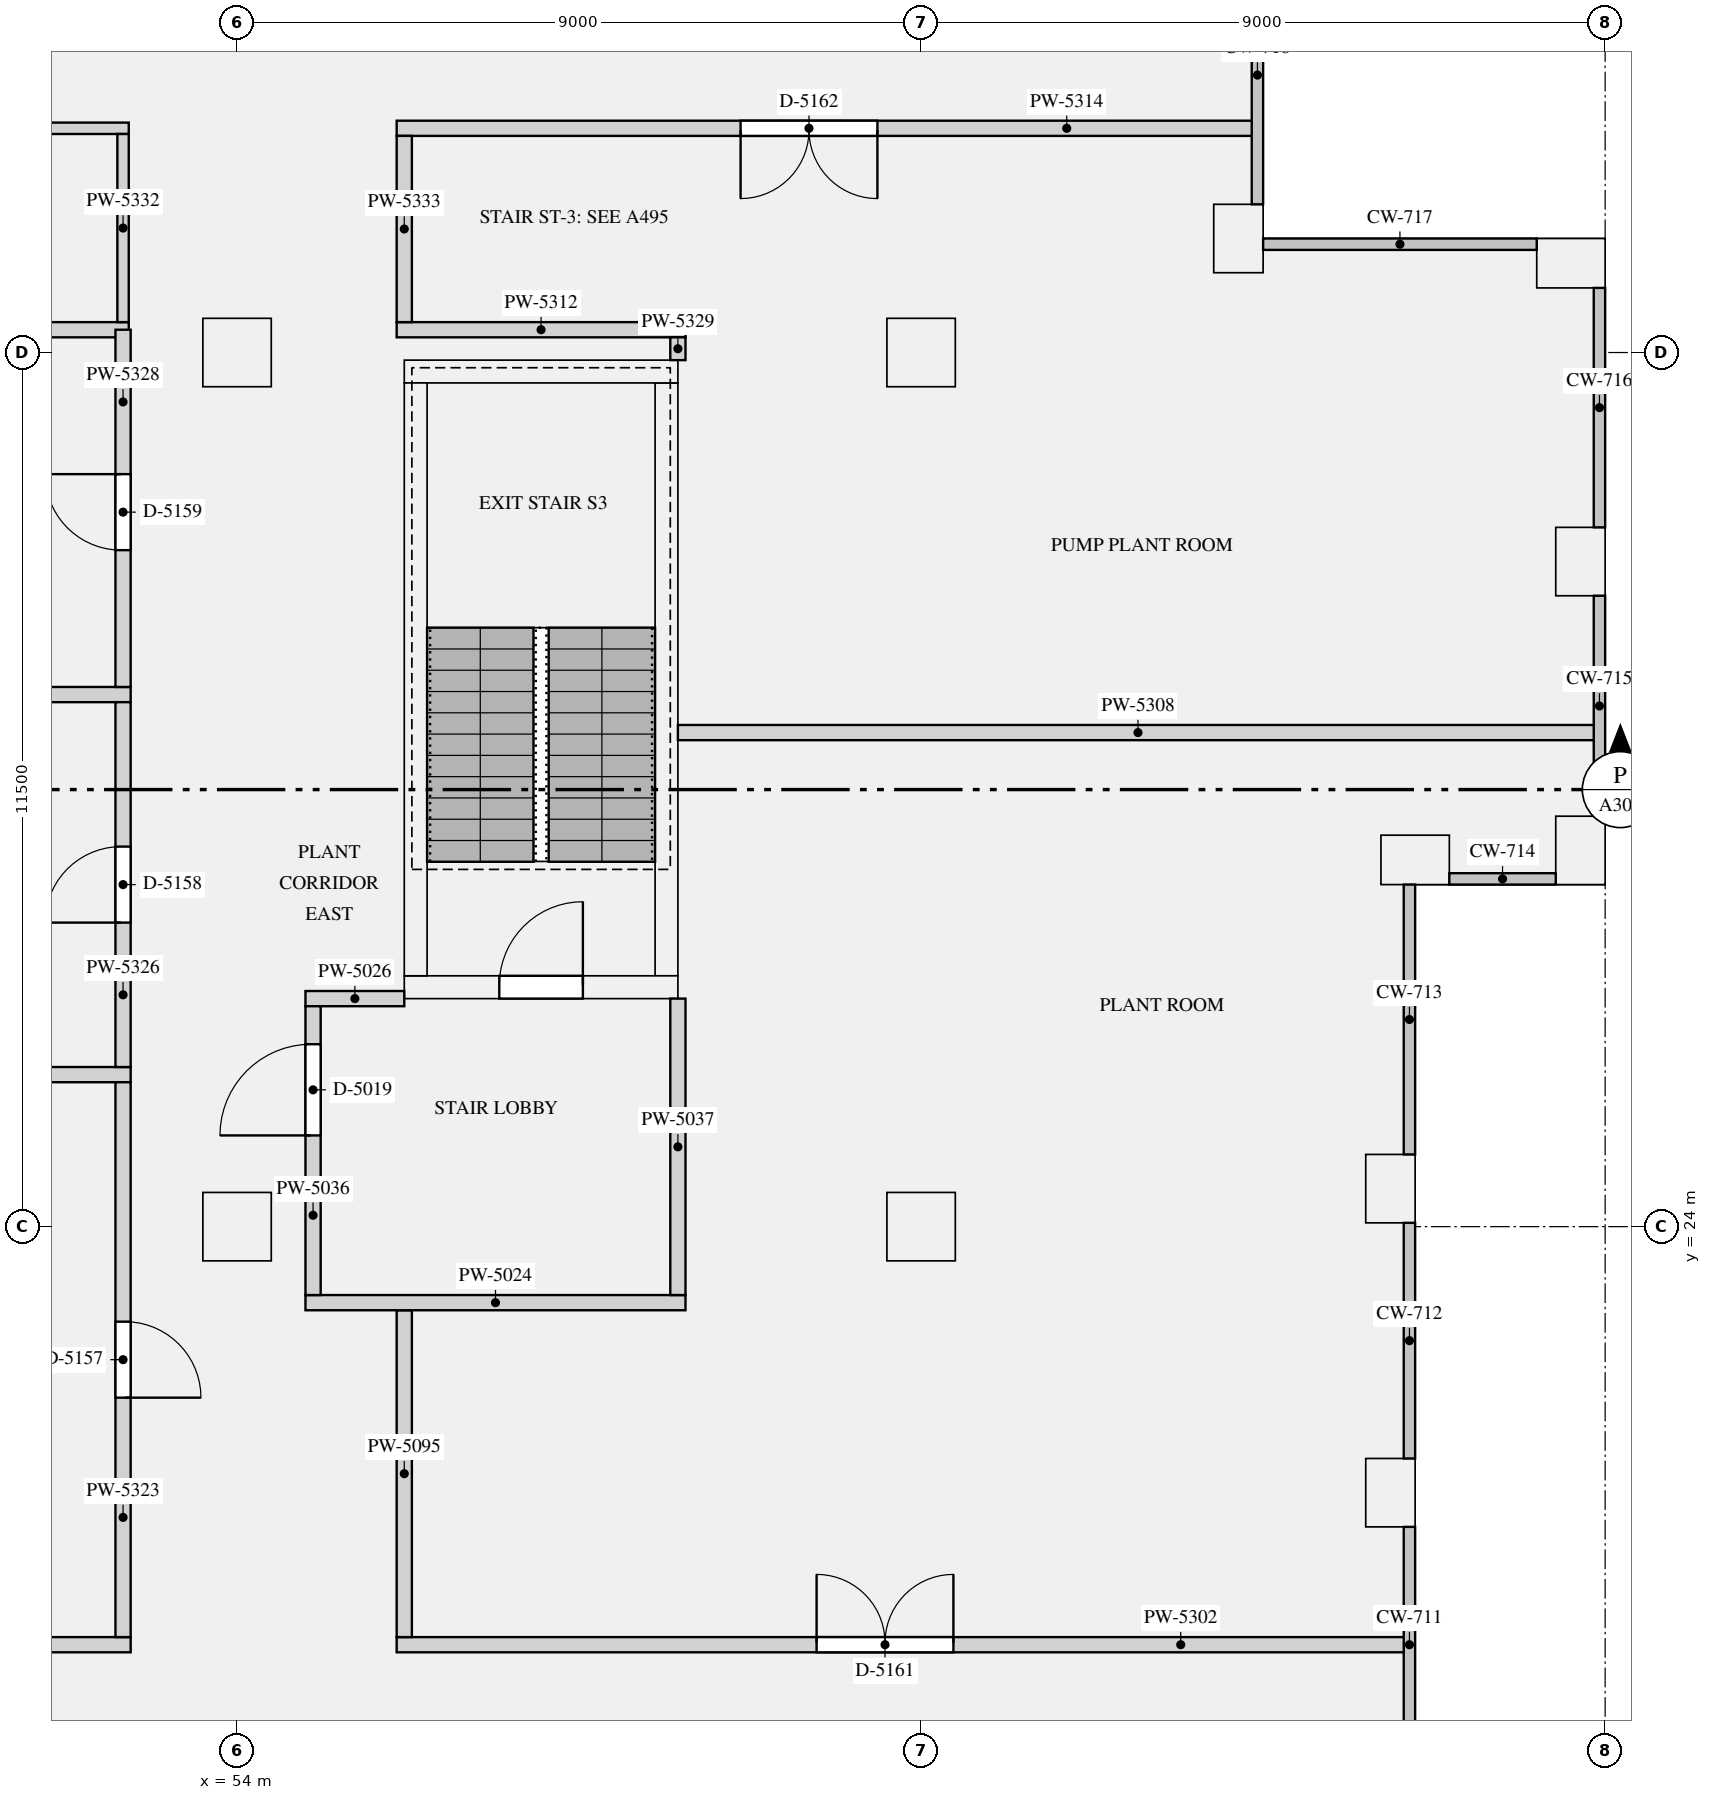
"""IFC4 building model, lengths in metres.
Left out: names, types, materials, properties, quantities, classifications, styles, units other than length and angle.
Written with IfcOpenShell. Run it as: python <this file> out.ifc"""

import sys

from ifc_helpers import new_model, si_unit, direction, frame, frame_2d, origin, origin_2d, place, context, subcontext, project, spatial, rectangle, extrude, element, fill, save


model = new_model("IFC4")
c1 = context("Model", 3, precision=1e-05, world=origin(), true_north=direction((0.0, 1.0)))
c2 = subcontext(c1, "Body", "Model", "MODEL_VIEW")
j1 = project(units=[si_unit("LENGTHUNIT", "METRE"), si_unit("PLANEANGLEUNIT", "RADIAN")], contexts=[c1])
p1 = place(None, origin())
s1 = spatial("IfcSite", under=j1, at=p1, CompositionType="ELEMENT")
p2 = place(p1, origin())
s2 = spatial("IfcBuilding", under=s1, at=p2, CompositionType="ELEMENT")
p3 = place(p2, frame((0.0, 0.0, 235.8)))
s3 = spatial("IfcBuildingStorey", under=s2, at=p3, CompositionType="ELEMENT", Elevation=235.8)
for number, where, z_axis, x_axis in (
    (1, (69.175, 20.5, 0.0), (0.0, 0.0, 1.0), (0.0, 1.0, 0.0)),
    (2, (69.175, 24.5, 0.0), (0.0, 0.0, 1.0), (0.0, 1.0, 0.0)),
    (3, (69.5, 28.825, 0.0), (0.0, 0.0, 1.0), (1.0, 0.0, 0.0)),
    (4, (71.675, 28.95, 0.0), (0.0, 0.0, 1.0), (0.0, 1.0, 0.0)),
    (5, (71.675, 32.75, 0.0), (0.0, 0.0, 1.0), (0.0, 1.0, 0.0)),
    (6, (71.55, 36.675, 0.0), (0.0, 0.0, 1.0), (-1.0, 0.0, 0.0)),
    (7, (67.175, 37.0, 0.0), (0.0, 0.0, 1.0), (0.0, 1.0, 0.0)),
):
    element("IfcColumn", number, at=place(p3, frame(where, z_axis=z_axis, x_axis=x_axis)), inside=s3, PredefinedType="USERDEFINED", context=c2, shape_type="SweptSolid", body=[
        extrude(rectangle(XDim=0.9, YDim=0.65, at=origin_2d()), origin(), (0.0, 0.0, 1.0), 4.2),
    ])
for number, where, z_axis, x_axis in (
    (8, (54.0, 24.0, 0.0), (0.0, 0.0, 1.0), (1.0, 0.0, 0.0)),
    (9, (63.0, 24.0, 0.0), (0.0, 0.0, 1.0), (1.0, 0.0, 0.0)),
    (10, (54.0, 35.5, 0.0), (0.0, 0.0, 1.0), (1.0, 0.0, 0.0)),
    (11, (63.0, 35.5, 0.0), (0.0, 0.0, 1.0), (1.0, 0.0, 0.0)),
):
    element("IfcColumn", number, at=place(p3, frame(where, z_axis=z_axis, x_axis=x_axis)), inside=s3, PredefinedType="COLUMN", context=c2, shape_type="SweptSolid", body=[
        extrude(rectangle(XDim=0.9, YDim=0.9, at=origin_2d()), origin(), (0.0, 0.0, 1.0), 4.2),
    ])
p4 = place(p3, frame((56.2, 27.15, 0.0), z_axis=(0.0, 0.0, 1.0), x_axis=(1.0, 0.0, 0.0)))
e12 = element("IfcWall", 12, at=p4, inside=s3, PredefinedType="SHEAR", context=c2, shape_type="SweptSolid", body=[
    extrude(rectangle(XDim=3.6, YDim=0.3, at=frame_2d((1.8, 0.0))), origin(), (0.0, 0.0, 1.0), 4.2),
])
p5 = place(p4, frame((1.25, 0.0, 0.0)))
e13 = element("IfcOpeningElement", 13, at=p5, cuts=e12, PredefinedType="OPENING", context=c2, shape_type="SweptSolid", body=[
    extrude(rectangle(XDim=1.1, YDim=2.1, at=frame_2d((0.55, 1.05))), frame((0.0, 0.16, 0.0), z_axis=(0.0, -1.0, 0.0), x_axis=(1.0, 0.0, 0.0)), (0.0, 0.0, 1.0), 0.32),
])
p6 = place(p3, frame((56.2, 35.25, 0.0), z_axis=(0.0, 0.0, 1.0), x_axis=(1.0, 0.0, 0.0)))
e14 = element("IfcWall", 14, at=p6, inside=s3, PredefinedType="SHEAR", context=c2, shape_type="SweptSolid", body=[
    extrude(rectangle(XDim=3.6, YDim=0.3, at=frame_2d((1.8, 0.0))), origin(), (0.0, 0.0, 1.0), 4.2),
])
for number, where, z_axis, x_axis in (
    (15, (56.35, 27.3, 0.0), (0.0, 0.0, 1.0), (0.0, 1.0, 0.0)),
    (16, (59.65, 27.3, 0.0), (0.0, 0.0, 1.0), (0.0, 1.0, 0.0)),
):
    element("IfcWall", number, at=place(p3, frame(where, z_axis=z_axis, x_axis=x_axis)), inside=s3, PredefinedType="SHEAR", context=c2, shape_type="SweptSolid", body=[
        extrude(rectangle(XDim=7.8, YDim=0.3, at=frame_2d((3.9, 0.0))), origin(), (0.0, 0.0, 1.0), 4.2),
    ])
p7 = place(p3, frame((54.9, 23.0, 0.0), z_axis=(0.0, 0.0, 1.0), x_axis=(1.0, 0.0, 0.0)))
e17 = element("IfcWall", 17, at=p7, inside=s3, PredefinedType="PARTITIONING", context=c2, shape_type="SweptSolid", body=[
    extrude(rectangle(XDim=5.0, YDim=0.2, at=frame_2d((2.5, 0.0))), origin(), (0.0, 0.0, 1.0), 3.85),
])
p8 = place(p3, frame((54.9, 27.0, 0.0), z_axis=(0.0, 0.0, 1.0), x_axis=(1.0, 0.0, 0.0)))
e18 = element("IfcWall", 18, at=p8, inside=s3, PredefinedType="PARTITIONING", context=c2, shape_type="SweptSolid", body=[
    extrude(rectangle(XDim=1.3, YDim=0.2, at=frame_2d((0.65, 0.0))), origin(), (0.0, 0.0, 1.0), 3.85),
])
p9 = place(p3, frame((55.0, 23.1, 0.0), z_axis=(0.0, 0.0, 1.0), x_axis=(0.0, 1.0, 0.0)))
e19 = element("IfcWall", 19, at=p9, inside=s3, PredefinedType="PARTITIONING", context=c2, shape_type="SweptSolid", body=[
    extrude(rectangle(XDim=3.8, YDim=0.2, at=frame_2d((1.9, 0.0))), origin(), (0.0, 0.0, 1.0), 3.85),
])
p10 = place(p9, frame((2.1, 0.0, 0.0)))
e20 = element("IfcOpeningElement", 20, at=p10, cuts=e19, PredefinedType="OPENING", context=c2, shape_type="SweptSolid", body=[
    extrude(rectangle(XDim=1.2, YDim=2.1, at=frame_2d((0.6, 1.05))), frame((0.0, 0.11, 0.0), z_axis=(0.0, -1.0, 0.0), x_axis=(1.0, 0.0, 0.0)), (0.0, 0.0, 1.0), 0.22),
])
p11 = place(p3, frame((59.8, 23.1, 0.0), z_axis=(0.0, 0.0, 1.0), x_axis=(0.0, 1.0, 0.0)))
e21 = element("IfcWall", 21, at=p11, inside=s3, PredefinedType="PARTITIONING", context=c2, shape_type="SweptSolid", body=[
    extrude(rectangle(XDim=3.9, YDim=0.2, at=frame_2d((1.95, 0.0))), origin(), (0.0, 0.0, 1.0), 3.85),
])
p12 = place(p3, frame((26.7, 18.5, 0.0), z_axis=(0.0, 0.0, 1.0), x_axis=(1.0, 0.0, 0.0)))
e22 = element("IfcWall", 22, at=p12, inside=s3, PredefinedType="PARTITIONING", context=c2, shape_type="SweptSolid", body=[
    extrude(rectangle(XDim=25.9, YDim=0.2, at=frame_2d((12.95, 0.0))), origin(), (0.0, 0.0, 1.0), 3.85),
])
p13 = place(p12, frame((3.2, 0.0, 0.0)))
e23 = element("IfcOpeningElement", 23, at=p13, cuts=e22, PredefinedType="OPENING", context=c2, shape_type="SweptSolid", body=[
    extrude(rectangle(XDim=1.0, YDim=2.1, at=frame_2d((0.5, 1.05))), frame((0.0, 0.11, 0.0), z_axis=(0.0, -1.0, 0.0), x_axis=(1.0, 0.0, 0.0)), (0.0, 0.0, 1.0), 0.22),
])
p14 = place(p12, frame((12.4, 0.0, 0.0)))
e24 = element("IfcOpeningElement", 24, at=p14, cuts=e22, PredefinedType="OPENING", context=c2, shape_type="SweptSolid", body=[
    extrude(rectangle(XDim=1.0, YDim=2.1, at=frame_2d((0.5, 1.05))), frame((0.0, 0.11, 0.0), z_axis=(0.0, -1.0, 0.0), x_axis=(1.0, 0.0, 0.0)), (0.0, 0.0, 1.0), 0.22),
])
p15 = place(p3, frame((56.1, 18.5, 0.0), z_axis=(0.0, 0.0, 1.0), x_axis=(1.0, 0.0, 0.0)))
e25 = element("IfcWall", 25, at=p15, inside=s3, PredefinedType="PARTITIONING", context=c2, shape_type="SweptSolid", body=[
    extrude(rectangle(XDim=13.307, YDim=0.2, at=frame_2d((6.653, 0.0))), origin(), (0.0, 0.0, 1.0), 3.85),
])
p16 = place(p15, frame((5.525, 0.0, 0.0)))
e26 = element("IfcOpeningElement", 26, at=p16, cuts=e25, PredefinedType="OPENING", context=c2, shape_type="SweptSolid", body=[
    extrude(rectangle(XDim=1.8, YDim=2.1, at=frame_2d((0.9, 1.05))), frame((0.0, 0.11, 0.0), z_axis=(0.0, -1.0, 0.0), x_axis=(1.0, 0.0, 0.0)), (0.0, 0.0, 1.0), 0.22),
])
p17 = place(p3, frame((45.096, 26.0, 0.0), z_axis=(0.0, 0.0, 1.0), x_axis=(1.0, 0.0, 0.0)))
e27 = element("IfcWall", 27, at=p17, inside=s3, PredefinedType="PARTITIONING", context=c2, shape_type="SweptSolid", body=[
    extrude(rectangle(XDim=7.504, YDim=0.2, at=frame_2d((3.752, 0.0))), origin(), (0.0, 0.0, 1.0), 3.85),
])
p18 = place(p3, frame((59.8, 30.5, 0.0), z_axis=(0.0, 0.0, 1.0), x_axis=(1.0, 0.0, 0.0)))
e28 = element("IfcWall", 28, at=p18, inside=s3, PredefinedType="PARTITIONING", context=c2, shape_type="SweptSolid", body=[
    extrude(rectangle(XDim=12.107, YDim=0.2, at=frame_2d((6.053, 0.0))), origin(), (0.0, 0.0, 1.0), 3.85),
])
p19 = place(p3, frame((45.096, 31.0, 0.0), z_axis=(0.0, 0.0, 1.0), x_axis=(1.0, 0.0, 0.0)))
e29 = element("IfcWall", 29, at=p19, inside=s3, PredefinedType="PARTITIONING", context=c2, shape_type="SweptSolid", body=[
    extrude(rectangle(XDim=7.504, YDim=0.2, at=frame_2d((3.752, 0.0))), origin(), (0.0, 0.0, 1.0), 3.85),
])
p20 = place(p3, frame((45.3, 35.8, 0.0), z_axis=(0.0, 0.0, 1.0), x_axis=(1.0, 0.0, 0.0)))
e30 = element("IfcWall", 30, at=p20, inside=s3, PredefinedType="PARTITIONING", context=c2, shape_type="SweptSolid", body=[
    extrude(rectangle(XDim=7.275, YDim=0.2, at=frame_2d((3.637, 0.0))), origin(), (0.0, 0.0, 1.0), 3.85),
])
p21 = place(p3, frame((56.1, 35.8, 0.0), z_axis=(0.0, 0.0, 1.0), x_axis=(1.0, 0.0, 0.0)))
e31 = element("IfcWall", 31, at=p21, inside=s3, PredefinedType="PARTITIONING", context=c2, shape_type="SweptSolid", body=[
    extrude(rectangle(XDim=3.8, YDim=0.2, at=frame_2d((1.9, 0.0))), origin(), (0.0, 0.0, 1.0), 3.85),
])
p22 = place(p3, frame((56.1, 38.45, 0.0), z_axis=(0.0, 0.0, 1.0), x_axis=(1.0, 0.0, 0.0)))
e32 = element("IfcWall", 32, at=p22, inside=s3, PredefinedType="PARTITIONING", context=c2, shape_type="SweptSolid", body=[
    extrude(rectangle(XDim=11.307, YDim=0.2, at=frame_2d((5.653, 0.0))), origin(), (0.0, 0.0, 1.0), 3.85),
])
p23 = place(p22, frame((4.525, 0.0, 0.0)))
e33 = element("IfcOpeningElement", 33, at=p23, cuts=e32, PredefinedType="OPENING", context=c2, shape_type="SweptSolid", body=[
    extrude(rectangle(XDim=1.8, YDim=2.1, at=frame_2d((0.9, 1.05))), frame((0.0, 0.11, 0.0), z_axis=(0.0, -1.0, 0.0), x_axis=(1.0, 0.0, 0.0)), (0.0, 0.0, 1.0), 0.22),
])
p24 = place(p3, frame((44.1, 38.45, 0.0), z_axis=(0.0, 0.0, 1.0), x_axis=(1.0, 0.0, 0.0)))
e34 = element("IfcWall", 34, at=p24, inside=s3, PredefinedType="PARTITIONING", context=c2, shape_type="SweptSolid", body=[
    extrude(rectangle(XDim=8.475, YDim=0.15, at=frame_2d((4.237, 0.0))), origin(), (0.0, 0.0, 1.0), 3.85),
])
p25 = place(p24, frame((3.7, 0.0, 0.0)))
e35 = element("IfcOpeningElement", 35, at=p25, cuts=e34, PredefinedType="OPENING", context=c2, shape_type="SweptSolid", body=[
    extrude(rectangle(XDim=0.9, YDim=2.1, at=frame_2d((0.45, 1.05))), frame((0.0, 0.085, 0.0), z_axis=(0.0, -1.0, 0.0), x_axis=(1.0, 0.0, 0.0)), (0.0, 0.0, 1.0), 0.17),
])
p26 = place(p3, frame((52.5, 18.6, 0.0), z_axis=(0.0, 0.0, 1.0), x_axis=(0.0, 1.0, 0.0)))
e36 = element("IfcWall", 36, at=p26, inside=s3, PredefinedType="PARTITIONING", context=c2, shape_type="SweptSolid", body=[
    extrude(rectangle(XDim=7.3, YDim=0.2, at=frame_2d((3.65, 0.0))), origin(), (0.0, 0.0, 1.0), 3.85),
])
p27 = place(p26, frame((3.15, 0.0, 0.0)))
e37 = element("IfcOpeningElement", 37, at=p27, cuts=e36, PredefinedType="OPENING", context=c2, shape_type="SweptSolid", body=[
    extrude(rectangle(XDim=1.0, YDim=2.1, at=frame_2d((0.5, 1.05))), frame((0.0, 0.11, 0.0), z_axis=(0.0, -1.0, 0.0), x_axis=(1.0, 0.0, 0.0)), (0.0, 0.0, 1.0), 0.22),
])
p28 = place(p3, frame((56.2, 18.6, 0.0), z_axis=(0.0, 0.0, 1.0), x_axis=(0.0, 1.0, 0.0)))
e38 = element("IfcWall", 38, at=p28, inside=s3, PredefinedType="PARTITIONING", context=c2, shape_type="SweptSolid", body=[
    extrude(rectangle(XDim=4.3, YDim=0.2, at=frame_2d((2.15, 0.0))), origin(), (0.0, 0.0, 1.0), 3.85),
])
p29 = place(p3, frame((52.5, 26.1, 0.0), z_axis=(0.0, 0.0, 1.0), x_axis=(0.0, 1.0, 0.0)))
e39 = element("IfcWall", 39, at=p29, inside=s3, PredefinedType="PARTITIONING", context=c2, shape_type="SweptSolid", body=[
    extrude(rectangle(XDim=4.8, YDim=0.2, at=frame_2d((2.4, 0.0))), origin(), (0.0, 0.0, 1.0), 3.85),
])
p30 = place(p29, frame((1.9, 0.0, 0.0)))
e40 = element("IfcOpeningElement", 40, at=p30, cuts=e39, PredefinedType="OPENING", context=c2, shape_type="SweptSolid", body=[
    extrude(rectangle(XDim=1.0, YDim=2.1, at=frame_2d((0.5, 1.05))), frame((0.0, 0.11, 0.0), z_axis=(0.0, -1.0, 0.0), x_axis=(1.0, 0.0, 0.0)), (0.0, 0.0, 1.0), 0.22),
])
p31 = place(p3, frame((52.5, 31.1, 0.0), z_axis=(0.0, 0.0, 1.0), x_axis=(0.0, 1.0, 0.0)))
e41 = element("IfcWall", 41, at=p31, inside=s3, PredefinedType="PARTITIONING", context=c2, shape_type="SweptSolid", body=[
    extrude(rectangle(XDim=4.7, YDim=0.2, at=frame_2d((2.35, 0.0))), origin(), (0.0, 0.0, 1.0), 3.85),
])
p32 = place(p31, frame((1.8, 0.0, 0.0)))
e42 = element("IfcOpeningElement", 42, at=p32, cuts=e41, PredefinedType="OPENING", context=c2, shape_type="SweptSolid", body=[
    extrude(rectangle(XDim=1.0, YDim=2.1, at=frame_2d((0.5, 1.05))), frame((0.0, 0.11, 0.0), z_axis=(0.0, -1.0, 0.0), x_axis=(1.0, 0.0, 0.0)), (0.0, 0.0, 1.0), 0.22),
])
p33 = place(p3, frame((59.8, 35.4, 0.0), z_axis=(0.0, 0.0, 1.0), x_axis=(0.0, 1.0, 0.0)))
e43 = element("IfcWall", 43, at=p33, inside=s3, PredefinedType="PARTITIONING", context=c2, shape_type="SweptSolid", body=[
    extrude(rectangle(XDim=0.3, YDim=0.2, at=frame_2d((0.15, 0.0))), origin(), (0.0, 0.0, 1.0), 3.85),
])
p34 = place(p3, frame((52.5, 35.9, 0.0), z_axis=(0.0, 0.0, 1.0), x_axis=(0.0, 1.0, 0.0)))
e44 = element("IfcWall", 44, at=p34, inside=s3, PredefinedType="PARTITIONING", context=c2, shape_type="SweptSolid", body=[
    extrude(rectangle(XDim=2.475, YDim=0.15, at=frame_2d((1.238, 0.0))), origin(), (0.0, 0.0, 1.0), 3.85),
])
p35 = place(p3, frame((56.2, 35.9, 0.0), z_axis=(0.0, 0.0, 1.0), x_axis=(0.0, 1.0, 0.0)))
e45 = element("IfcWall", 45, at=p35, inside=s3, PredefinedType="PARTITIONING", context=c2, shape_type="SweptSolid", body=[
    extrude(rectangle(XDim=2.45, YDim=0.2, at=frame_2d((1.225, 0.0))), origin(), (0.0, 0.0, 1.0), 3.85),
])
p36 = place(p5, origin())
e46 = element("IfcDoor", 46, at=p36, inside=s3, OperationType="SINGLE_SWING_RIGHT", PredefinedType="DOOR", context=c2, shape_type="SweptSolid", body=[
    extrude(rectangle(XDim=1.1, YDim=2.1, at=frame_2d((0.55, 1.05))), frame((0.0, 0.025, 0.0), z_axis=(0.0, -1.0, 0.0), x_axis=(1.0, 0.0, 0.0)), (0.0, 0.0, 1.0), 0.05),
])
fill(e13, e46)
p37 = place(p10, origin())
e47 = element("IfcDoor", 47, at=p37, inside=s3, OperationType="SINGLE_SWING_LEFT", PredefinedType="DOOR", context=c2, shape_type="SweptSolid", body=[
    extrude(rectangle(XDim=1.2, YDim=2.1, at=frame_2d((0.6, 1.05))), frame((0.0, 0.025, 0.0), z_axis=(0.0, -1.0, 0.0), x_axis=(1.0, 0.0, 0.0)), (0.0, 0.0, 1.0), 0.05),
])
fill(e20, e47)
p38 = place(p27, frame((1.0, 0.0, 0.0), z_axis=(0.0, 0.0, 1.0), x_axis=(-1.0, 0.0, 0.0)))
e48 = element("IfcDoor", 48, at=p38, inside=s3, OperationType="SINGLE_SWING_RIGHT", PredefinedType="DOOR", context=c2, shape_type="SweptSolid", body=[
    extrude(rectangle(XDim=1.0, YDim=2.1, at=frame_2d((0.5, 1.05))), frame((0.0, 0.025, 0.0), z_axis=(0.0, -1.0, 0.0), x_axis=(1.0, 0.0, 0.0)), (0.0, 0.0, 1.0), 0.05),
])
fill(e37, e48)
p39 = place(p30, origin())
e49 = element("IfcDoor", 49, at=p39, inside=s3, OperationType="SINGLE_SWING_LEFT", PredefinedType="DOOR", context=c2, shape_type="SweptSolid", body=[
    extrude(rectangle(XDim=1.0, YDim=2.1, at=frame_2d((0.5, 1.05))), frame((0.0, 0.025, 0.0), z_axis=(0.0, -1.0, 0.0), x_axis=(1.0, 0.0, 0.0)), (0.0, 0.0, 1.0), 0.05),
])
fill(e40, e49)
p40 = place(p32, origin())
e50 = element("IfcDoor", 50, at=p40, inside=s3, OperationType="SINGLE_SWING_RIGHT", PredefinedType="DOOR", context=c2, shape_type="SweptSolid", body=[
    extrude(rectangle(XDim=1.0, YDim=2.1, at=frame_2d((0.5, 1.05))), frame((0.0, 0.025, 0.0), z_axis=(0.0, -1.0, 0.0), x_axis=(1.0, 0.0, 0.0)), (0.0, 0.0, 1.0), 0.05),
])
fill(e42, e50)
p41 = place(p16, origin())
e51 = element("IfcDoor", 51, at=p41, inside=s3, OperationType="DOUBLE_DOOR_SINGLE_SWING", PredefinedType="DOOR", context=c2, shape_type="SweptSolid", body=[
    extrude(rectangle(XDim=1.8, YDim=2.1, at=frame_2d((0.9, 1.05))), frame((0.0, 0.025, 0.0), z_axis=(0.0, -1.0, 0.0), x_axis=(1.0, 0.0, 0.0)), (0.0, 0.0, 1.0), 0.05),
])
fill(e26, e51)
p42 = place(p23, frame((1.8, 0.0, 0.0), z_axis=(0.0, 0.0, 1.0), x_axis=(-1.0, 0.0, 0.0)))
e52 = element("IfcDoor", 52, at=p42, inside=s3, OperationType="DOUBLE_DOOR_SINGLE_SWING", PredefinedType="DOOR", context=c2, shape_type="SweptSolid", body=[
    extrude(rectangle(XDim=1.8, YDim=2.1, at=frame_2d((0.9, 1.05))), frame((0.0, 0.025, 0.0), z_axis=(0.0, -1.0, 0.0), x_axis=(1.0, 0.0, 0.0)), (0.0, 0.0, 1.0), 0.05),
])
fill(e33, e52)
save(model, sys.argv[1])
